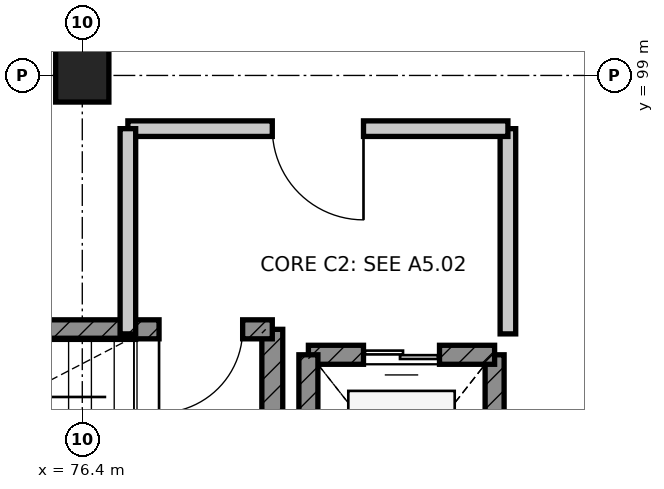
"""IFC4 building model, lengths in metres.
Left out: names, types, materials, properties, quantities, classifications, styles, units other than length and angle.
Written with IfcOpenShell. Run it as: python <this file> out.ifc"""

import sys

from ifc_helpers import new_model, si_unit, direction, frame, frame_2d, origin, origin_2d, place, context, subcontext, project, spatial, rectangle, extrude, element, fill, save


model = new_model("IFC4")
c1 = context("Model", 3, precision=1e-05, world=origin(), true_north=direction((0.0, 1.0)))
c2 = subcontext(c1, "Body", "Model", "MODEL_VIEW")
j1 = project(units=[si_unit("LENGTHUNIT", "METRE"), si_unit("PLANEANGLEUNIT", "RADIAN")], contexts=[c1])
p1 = place(None, origin())
s1 = spatial("IfcSite", under=j1, at=p1, CompositionType="ELEMENT")
p2 = place(p1, origin())
s2 = spatial("IfcBuilding", under=s1, at=p2, CompositionType="ELEMENT")
p3 = place(p2, frame((0.0, 0.0, 22.8)))
s3 = spatial("IfcBuildingStorey", under=s2, at=p3, CompositionType="ELEMENT", Elevation=22.8)
p4 = place(p3, frame((76.4, 99.0, 0.0), z_axis=(0.0, 0.0, 1.0), x_axis=(1.0, 0.0, 0.0)))
e1 = element("IfcColumn", 1, at=p4, inside=s3, PredefinedType="COLUMN", context=c2, shape_type="SweptSolid", body=[
    extrude(rectangle(XDim=0.7, YDim=0.7, at=origin_2d()), origin(), (0.0, 0.0, 1.0), 3.6),
])
p5 = place(p3, frame((78.9, 92.1, 0.0), z_axis=(0.0, 0.0, 1.0), x_axis=(0.0, 1.0, 0.0)))
e2 = element("IfcWall", 2, at=p5, inside=s3, PredefinedType="SHEAR", context=c2, shape_type="SweptSolid", body=[
    extrude(rectangle(XDim=3.56, YDim=0.275, at=frame_2d((1.78, 0.0))), origin(), (0.0, 0.0, 1.0), 3.35),
])
p6 = place(p3, frame((78.9, 95.66, 0.0), z_axis=(0.0, 0.0, 1.0), x_axis=(-1.0, 0.0, 0.0)))
e3 = element("IfcWall", 3, at=p6, inside=s3, PredefinedType="SHEAR", context=c2, shape_type="SweptSolid", body=[
    extrude(rectangle(XDim=8.4, YDim=0.25, at=frame_2d((4.2, 0.0))), origin(), (0.0, 0.0, 1.0), 3.35),
])
p7 = place(p6, frame((0.39, 0.0, 0.0)))
e4 = element("IfcOpeningElement", 4, at=p7, cuts=e3, PredefinedType="OPENING", context=c2, shape_type="SweptSolid", body=[
    extrude(rectangle(XDim=1.1, YDim=2.1, at=frame_2d((0.55, 1.05))), frame((0.0, 0.135, 0.0), z_axis=(0.0, -1.0, 0.0), x_axis=(1.0, 0.0, 0.0)), (0.0, 0.0, 1.0), 0.27),
])
p8 = place(p3, frame((81.825, 92.275, 0.0), z_axis=(0.0, 0.0, 1.0), x_axis=(0.0, 1.0, 0.0)))
e5 = element("IfcWall", 5, at=p8, inside=s3, PredefinedType="SHEAR", context=c2, shape_type="SweptSolid", body=[
    extrude(rectangle(XDim=3.05, YDim=0.25, at=frame_2d((1.525, 0.0))), origin(), (0.0, 0.0, 1.0), 3.35),
])
p9 = place(p3, frame((81.825, 95.325, 0.0), z_axis=(0.0, 0.0, 1.0), x_axis=(-1.0, 0.0, 0.0)))
e6 = element("IfcWall", 6, at=p9, inside=s3, PredefinedType="SHEAR", context=c2, shape_type="SweptSolid", body=[
    extrude(rectangle(XDim=2.45, YDim=0.25, at=frame_2d((1.225, 0.0))), origin(), (0.0, 0.0, 1.0), 3.35),
])
p10 = place(p9, frame((0.725, 0.0, 0.0)))
e7 = element("IfcOpeningElement", 7, at=p10, cuts=e6, PredefinedType="OPENING", context=c2, shape_type="SweptSolid", body=[
    extrude(rectangle(XDim=1.0, YDim=2.15, at=frame_2d((0.5, 1.075))), frame((0.0, 0.135, 0.0), z_axis=(0.0, -1.0, 0.0), x_axis=(1.0, 0.0, 0.0)), (0.0, 0.0, 1.0), 0.27),
])
p11 = place(p3, frame((79.375, 95.325, 0.0), z_axis=(0.0, 0.0, 1.0), x_axis=(0.0, -1.0, 0.0)))
e8 = element("IfcWall", 8, at=p11, inside=s3, PredefinedType="SHEAR", context=c2, shape_type="SweptSolid", body=[
    extrude(rectangle(XDim=3.05, YDim=0.25, at=frame_2d((1.525, 0.0))), origin(), (0.0, 0.0, 1.0), 3.35),
])
p12 = place(p3, frame((82.0, 95.6, 0.0), z_axis=(0.0, 0.0, 1.0), x_axis=(0.0, 1.0, 0.0)))
e9 = element("IfcWall", 9, at=p12, inside=s3, PredefinedType="PARTITIONING", context=c2, shape_type="SweptSolid", body=[
    extrude(rectangle(XDim=2.7, YDim=0.205, at=frame_2d((1.35, 0.0))), origin(), (0.0, 0.0, 1.0), 3.35),
])
p13 = place(p3, frame((82.0, 98.3, 0.0), z_axis=(0.0, 0.0, 1.0), x_axis=(-1.0, 0.0, 0.0)))
e10 = element("IfcWall", 10, at=p13, inside=s3, PredefinedType="PARTITIONING", context=c2, shape_type="SweptSolid", body=[
    extrude(rectangle(XDim=5.0, YDim=0.205, at=frame_2d((2.5, 0.0))), origin(), (0.0, 0.0, 1.0), 3.35),
])
p14 = place(p13, frame((1.9, 0.0, 0.0)))
e11 = element("IfcOpeningElement", 11, at=p14, cuts=e10, PredefinedType="OPENING", context=c2, shape_type="SweptSolid", body=[
    extrude(rectangle(XDim=1.2, YDim=2.1, at=frame_2d((0.6, 1.05))), frame((0.0, 0.113, 0.0), z_axis=(0.0, -1.0, 0.0), x_axis=(1.0, 0.0, 0.0)), (0.0, 0.0, 1.0), 0.225),
])
p15 = place(p3, frame((77.0, 98.3, 0.0), z_axis=(0.0, 0.0, 1.0), x_axis=(0.0, -1.0, 0.0)))
e12 = element("IfcWall", 12, at=p15, inside=s3, PredefinedType="PARTITIONING", context=c2, shape_type="SweptSolid", body=[
    extrude(rectangle(XDim=2.7, YDim=0.205, at=frame_2d((1.35, 0.0))), origin(), (0.0, 0.0, 1.0), 3.35),
])
p16 = place(p7, origin())
e13 = element("IfcDoor", 13, at=p16, inside=s3, OperationType="SINGLE_SWING_RIGHT", PredefinedType="DOOR", context=c2, shape_type="SweptSolid", body=[
    extrude(rectangle(XDim=1.1, YDim=2.1, at=frame_2d((0.55, 1.05))), frame((0.0, 0.025, 0.0), z_axis=(0.0, -1.0, 0.0), x_axis=(1.0, 0.0, 0.0)), (0.0, 0.0, 1.0), 0.05),
])
fill(e4, e13)
p17 = place(p10, origin())
e14 = element("IfcDoor", 14, at=p17, inside=s3, OperationType="DOUBLE_DOOR_SLIDING", PredefinedType="DOOR", context=c2, shape_type="SweptSolid", body=[
    extrude(rectangle(XDim=1.0, YDim=2.15, at=frame_2d((0.5, 1.075))), frame((0.0, 0.025, 0.0), z_axis=(0.0, -1.0, 0.0), x_axis=(1.0, 0.0, 0.0)), (0.0, 0.0, 1.0), 0.05),
])
fill(e7, e14)
p18 = place(p14, origin())
e15 = element("IfcDoor", 15, at=p18, inside=s3, OperationType="SINGLE_SWING_LEFT", PredefinedType="DOOR", context=c2, shape_type="SweptSolid", body=[
    extrude(rectangle(XDim=1.2, YDim=2.1, at=frame_2d((0.6, 1.05))), frame((0.0, 0.025, 0.0), z_axis=(0.0, -1.0, 0.0), x_axis=(1.0, 0.0, 0.0)), (0.0, 0.0, 1.0), 0.05),
])
fill(e11, e15)
save(model, sys.argv[1])
